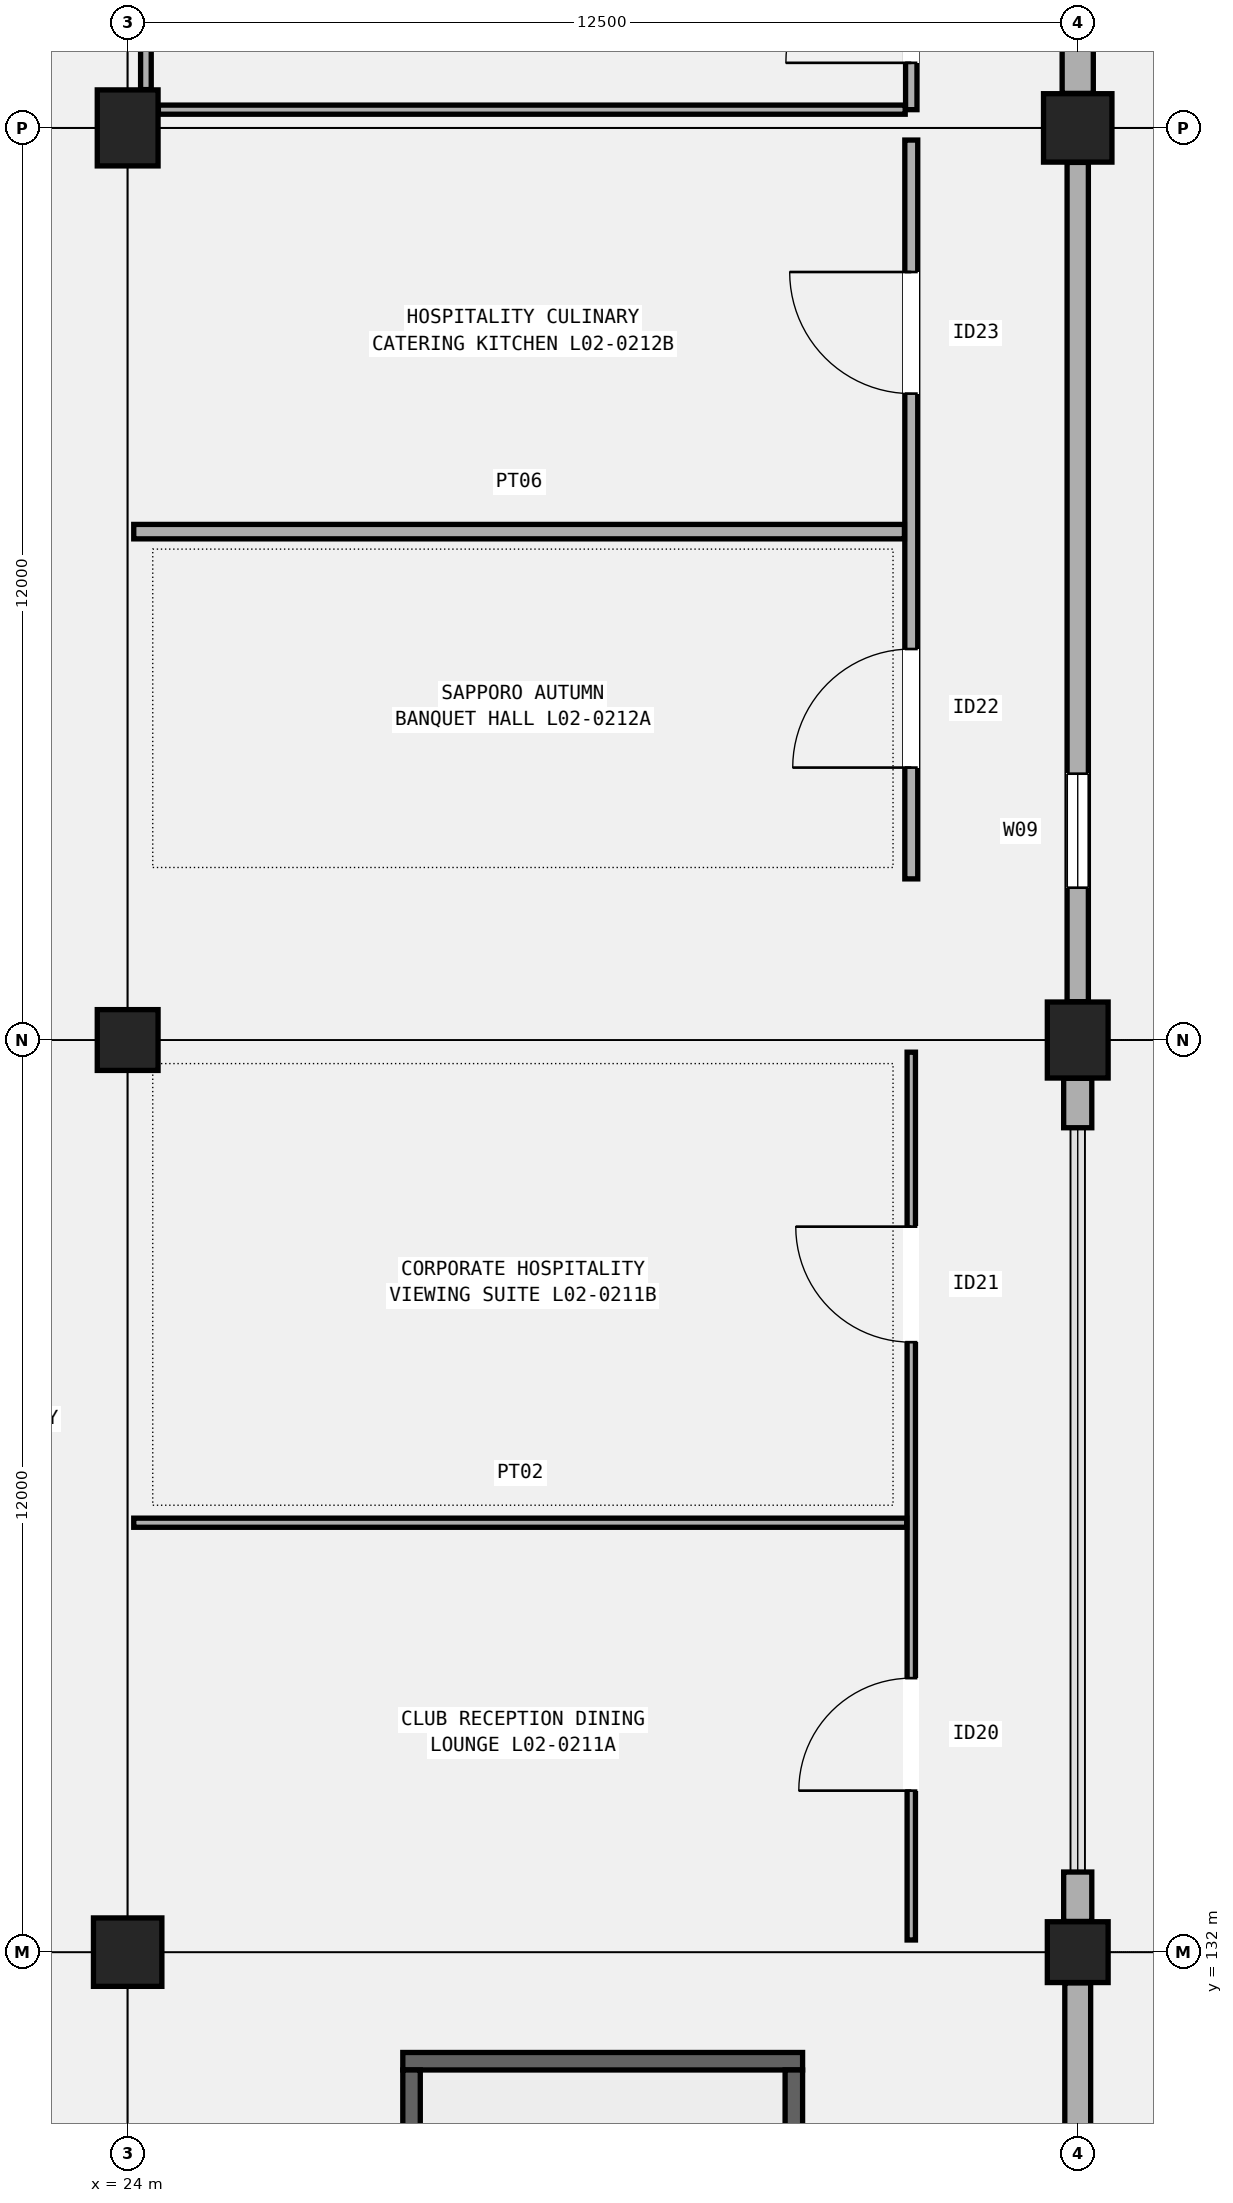
"""IFC4 building model, lengths in metres.
Left out: names, types, materials, properties, quantities, classifications, styles, units other than length and angle.
Written with IfcOpenShell. Run it as: python <this file> out.ifc"""

import sys

from ifc_helpers import new_model, si_unit, direction, frame, frame_2d, origin, origin_2d, place, context, subcontext, project, spatial, rectangle, extrude, element, fill, save


model = new_model("IFC4")
c1 = context("Model", 3, precision=1e-05, world=origin(), true_north=direction((0.0, 1.0)))
c2 = subcontext(c1, "Body", "Model", "MODEL_VIEW")
j1 = project(units=[si_unit("LENGTHUNIT", "METRE"), si_unit("PLANEANGLEUNIT", "RADIAN")], contexts=[c1])
p1 = place(None, origin())
s1 = spatial("IfcSite", under=j1, at=p1, CompositionType="ELEMENT")
p2 = place(p1, origin())
s2 = spatial("IfcBuilding", under=s1, at=p2, CompositionType="ELEMENT")
p3 = place(p2, frame((0.0, 0.0, 10.2)))
s3 = spatial("IfcBuildingStorey", under=s2, at=p3, CompositionType="ELEMENT", Elevation=10.2)
p4 = place(p3, frame((24.0, 132.0, 0.0), z_axis=(0.0, 0.0, 1.0), x_axis=(1.0, 0.0, 0.0)))
e1 = element("IfcColumn", 1, at=p4, inside=s3, PredefinedType="COLUMN", context=c2, shape_type="SweptSolid", body=[
    extrude(rectangle(XDim=0.9, YDim=0.9, at=origin_2d()), origin(), (0.0, 0.0, 1.0), 5.1),
])
p5 = place(p3, frame((24.0, 144.0, 0.0), z_axis=(0.0, 0.0, 1.0), x_axis=(1.0, 0.0, 0.0)))
e2 = element("IfcColumn", 2, at=p5, inside=s3, PredefinedType="COLUMN", context=c2, shape_type="SweptSolid", body=[
    extrude(rectangle(XDim=0.8, YDim=0.8, at=origin_2d()), origin(), (0.0, 0.0, 1.0), 5.1),
])
p6 = place(p3, frame((24.0, 156.0, 0.0), z_axis=(0.0, 0.0, 1.0), x_axis=(1.0, 0.0, 0.0)))
e3 = element("IfcColumn", 3, at=p6, inside=s3, PredefinedType="COLUMN", context=c2, shape_type="SweptSolid", body=[
    extrude(rectangle(XDim=0.8, YDim=1.0, at=origin_2d()), origin(), (0.0, 0.0, 1.0), 5.1),
])
p7 = place(p3, frame((36.5, 132.0, 0.0), z_axis=(0.0, 0.0, 1.0), x_axis=(1.0, 0.0, 0.0)))
e4 = element("IfcColumn", 4, at=p7, inside=s3, PredefinedType="COLUMN", context=c2, shape_type="SweptSolid", body=[
    extrude(rectangle(XDim=0.8, YDim=0.8, at=origin_2d()), origin(), (0.0, 0.0, 1.0), 5.1),
])
p8 = place(p3, frame((36.5, 144.0, 0.0), z_axis=(0.0, 0.0, 1.0), x_axis=(1.0, 0.0, 0.0)))
e5 = element("IfcColumn", 5, at=p8, inside=s3, PredefinedType="COLUMN", context=c2, shape_type="SweptSolid", body=[
    extrude(rectangle(XDim=0.8, YDim=1.0, at=origin_2d()), origin(), (0.0, 0.0, 1.0), 5.1),
])
p9 = place(p3, frame((36.5, 156.0, 0.0), z_axis=(0.0, 0.0, 1.0), x_axis=(1.0, 0.0, 0.0)))
e6 = element("IfcColumn", 6, at=p9, inside=s3, PredefinedType="COLUMN", context=c2, shape_type="SweptSolid", body=[
    extrude(rectangle(XDim=0.9, YDim=0.9, at=origin_2d()), origin(), (0.0, 0.0, 1.0), 5.1),
])
p10 = place(p3, frame((36.5, 120.454, 0.0), z_axis=(0.0, 0.0, 1.0), x_axis=(0.0, 1.0, 0.0)))
e7 = element("IfcWall", 7, at=p10, inside=s3, PredefinedType="SOLIDWALL", context=c2, shape_type="SweptSolid", body=[
    extrude(rectangle(XDim=11.142, YDim=0.34, at=frame_2d((5.571, 0.0))), origin(), (0.0, 0.0, 1.0), 4.12),
])
p11 = place(p10, frame((1.5, 0.0, 0.95)))
e8 = element("IfcOpeningElement", 8, at=p11, cuts=e7, PredefinedType="OPENING", context=c2, shape_type="SweptSolid", body=[
    extrude(rectangle(XDim=1.35, YDim=2.4, at=frame_2d((0.675, 1.2))), frame((0.0, 0.18, 0.0), z_axis=(0.0, -1.0, 0.0), x_axis=(1.0, 0.0, 0.0)), (0.0, 0.0, 1.0), 0.36),
])
p12 = place(p3, frame((36.5, 132.404, 0.0), z_axis=(0.0, 0.0, 1.0), x_axis=(0.0, 1.0, 0.0)))
e9 = element("IfcWall", 9, at=p12, inside=s3, PredefinedType="SOLIDWALL", context=c2, shape_type="SweptSolid", body=[
    extrude(rectangle(XDim=0.65, YDim=0.37, at=frame_2d((0.325, 0.0))), origin(), (0.0, 0.0, 1.0), 4.232),
])
p13 = place(p3, frame((36.5, 142.846, 0.0), z_axis=(0.0, 0.0, 1.0), x_axis=(0.0, 1.0, 0.0)))
e10 = element("IfcWall", 10, at=p13, inside=s3, PredefinedType="SOLIDWALL", context=c2, shape_type="SweptSolid", body=[
    extrude(rectangle(XDim=0.65, YDim=0.37, at=frame_2d((0.325, 0.0))), origin(), (0.0, 0.0, 1.0), 4.232),
])
p14 = place(p3, frame((36.5, 144.504, 0.0), z_axis=(0.0, 0.0, 1.0), x_axis=(0.0, 1.0, 0.0)))
e11 = element("IfcWall", 11, at=p14, inside=s3, PredefinedType="SOLIDWALL", context=c2, shape_type="SweptSolid", body=[
    extrude(rectangle(XDim=11.042, YDim=0.28, at=frame_2d((5.521, 0.0))), origin(), (0.0, 0.0, 1.0), 4.02),
])
p15 = place(p14, frame((1.5, 0.0, 0.95)))
e12 = element("IfcOpeningElement", 12, at=p15, cuts=e11, PredefinedType="OPENING", context=c2, shape_type="SweptSolid", body=[
    extrude(rectangle(XDim=1.5, YDim=1.8, at=frame_2d((0.75, 0.9))), frame((0.0, 0.15, 0.0), z_axis=(0.0, -1.0, 0.0), x_axis=(1.0, 0.0, 0.0)), (0.0, 0.0, 1.0), 0.3),
])
p16 = place(p3, frame((36.5, 156.454, 0.0), z_axis=(0.0, 0.0, 1.0), x_axis=(0.0, 1.0, 0.0)))
e13 = element("IfcWall", 13, at=p16, inside=s3, PredefinedType="SOLIDWALL", context=c2, shape_type="SweptSolid", body=[
    extrude(rectangle(XDim=11.142, YDim=0.41, at=frame_2d((5.571, 0.0))), origin(), (0.0, 0.0, 1.0), 4.12),
])
p17 = place(p16, frame((1.5, 0.0, 0.95)))
e14 = element("IfcOpeningElement", 14, at=p17, cuts=e13, PredefinedType="OPENING", context=c2, shape_type="SweptSolid", body=[
    extrude(rectangle(XDim=1.5, YDim=2.25, at=frame_2d((0.75, 1.125))), frame((0.0, 0.215, 0.0), z_axis=(0.0, -1.0, 0.0), x_axis=(1.0, 0.0, 0.0)), (0.0, 0.0, 1.0), 0.43),
])
p18 = place(p3, frame((27.62, 130.565, 0.0), z_axis=(0.0, 0.0, 1.0), x_axis=(1.0, 0.0, 0.0)))
e15 = element("IfcWall", 15, at=p18, inside=s3, PredefinedType="SHEAR", context=c2, shape_type="SweptSolid", body=[
    extrude(rectangle(XDim=5.26, YDim=0.23, at=frame_2d((2.63, 0.0))), origin(), (0.0, 0.0, 1.0), 4.82),
])
for number, where, z_axis, x_axis in (
    (16, (27.735, 121.55, 0.0), (0.0, 0.0, 1.0), (0.0, 1.0, 0.0)),
    (17, (32.765, 121.55, 0.0), (0.0, 0.0, 1.0), (0.0, 1.0, 0.0)),
):
    element("IfcWall", number, at=place(p3, frame(where, z_axis=z_axis, x_axis=x_axis)), inside=s3, PredefinedType="SHEAR", context=c2, shape_type="SweptSolid", body=[
        extrude(rectangle(XDim=8.9, YDim=0.23, at=frame_2d((4.45, 0.0))), origin(), (0.0, 0.0, 1.0), 4.82),
    ])
p19 = place(p3, frame((34.31, 132.16, 0.0), z_axis=(0.0, 0.0, 1.0), x_axis=(0.0, 1.0, 0.0)))
e18 = element("IfcWall", 18, at=p19, inside=s3, PredefinedType="PARTITIONING", context=c2, shape_type="SweptSolid", body=[
    extrude(rectangle(XDim=11.68, YDim=0.11, at=frame_2d((5.84, 0.0))), origin(), (0.0, 0.0, 1.0), 4.22),
])
p20 = place(p19, frame((1.965, 0.0, 0.0)))
e19 = element("IfcOpeningElement", 19, at=p20, cuts=e18, PredefinedType="OPENING", context=c2, shape_type="SweptSolid", body=[
    extrude(rectangle(XDim=1.48, YDim=2.24, at=frame_2d((0.74, 1.12))), frame((0.0, 0.065, 0.0), z_axis=(0.0, -1.0, 0.0), x_axis=(1.0, 0.0, 0.0)), (0.0, 0.0, 1.0), 0.13),
])
p21 = place(p19, frame((7.865, 0.0, 0.0)))
e20 = element("IfcOpeningElement", 20, at=p21, cuts=e18, PredefinedType="OPENING", context=c2, shape_type="SweptSolid", body=[
    extrude(rectangle(XDim=1.52, YDim=2.28, at=frame_2d((0.76, 1.14))), frame((0.0, 0.065, 0.0), z_axis=(0.0, -1.0, 0.0), x_axis=(1.0, 0.0, 0.0)), (0.0, 0.0, 1.0), 0.13),
])
p22 = place(p3, frame((24.08, 137.65, 0.0), z_axis=(0.0, 0.0, 1.0), x_axis=(1.0, 0.0, 0.0)))
e21 = element("IfcWall", 21, at=p22, inside=s3, PredefinedType="PARTITIONING", context=c2, shape_type="SweptSolid", body=[
    extrude(rectangle(XDim=10.17, YDim=0.12, at=frame_2d((5.085, 0.0))), origin(), (0.0, 0.0, 1.0), 4.22),
])
p23 = place(p3, frame((34.31, 146.12, 0.0), z_axis=(0.0, 0.0, 1.0), x_axis=(0.0, 1.0, 0.0)))
e22 = element("IfcWall", 22, at=p23, inside=s3, PredefinedType="PARTITIONING", context=c2, shape_type="SweptSolid", body=[
    extrude(rectangle(XDim=9.72, YDim=0.17, at=frame_2d((4.86, 0.0))), origin(), (0.0, 0.0, 1.0), 4.22),
])
p24 = place(p23, frame((1.464, 0.0, 0.0)))
e23 = element("IfcOpeningElement", 23, at=p24, cuts=e22, PredefinedType="OPENING", context=c2, shape_type="SweptSolid", body=[
    extrude(rectangle(XDim=1.56, YDim=2.26, at=frame_2d((0.78, 1.13))), frame((0.0, 0.095, 0.0), z_axis=(0.0, -1.0, 0.0), x_axis=(1.0, 0.0, 0.0)), (0.0, 0.0, 1.0), 0.19),
])
p25 = place(p23, frame((6.384, 0.0, 0.0)))
e24 = element("IfcOpeningElement", 24, at=p25, cuts=e22, PredefinedType="OPENING", context=c2, shape_type="SweptSolid", body=[
    extrude(rectangle(XDim=1.6, YDim=2.3, at=frame_2d((0.8, 1.15))), frame((0.0, 0.095, 0.0), z_axis=(0.0, -1.0, 0.0), x_axis=(1.0, 0.0, 0.0)), (0.0, 0.0, 1.0), 0.19),
])
p26 = place(p3, frame((24.08, 150.688, 0.0), z_axis=(0.0, 0.0, 1.0), x_axis=(1.0, 0.0, 0.0)))
e25 = element("IfcWall", 25, at=p26, inside=s3, PredefinedType="PARTITIONING", context=c2, shape_type="SweptSolid", body=[
    extrude(rectangle(XDim=10.14, YDim=0.19, at=frame_2d((5.07, 0.0))), origin(), (0.0, 0.0, 1.0), 4.22),
])
p27 = place(p3, frame((34.31, 156.24, 0.0), z_axis=(0.0, 0.0, 1.0), x_axis=(0.0, 1.0, 0.0)))
e26 = element("IfcWall", 26, at=p27, inside=s3, PredefinedType="PARTITIONING", context=c2, shape_type="SweptSolid", body=[
    extrude(rectangle(XDim=11.736, YDim=0.15, at=frame_2d((5.868, 0.0))), origin(), (0.0, 0.0, 1.0), 4.22),
])
p28 = place(p27, frame((0.616, 0.0, 0.0)))
e27 = element("IfcOpeningElement", 27, at=p28, cuts=e26, PredefinedType="OPENING", context=c2, shape_type="SweptSolid", body=[
    extrude(rectangle(XDim=1.65, YDim=2.28, at=frame_2d((0.825, 1.14))), frame((0.0, 0.085, 0.0), z_axis=(0.0, -1.0, 0.0), x_axis=(1.0, 0.0, 0.0)), (0.0, 0.0, 1.0), 0.17),
])
p29 = place(p27, frame((4.192, 0.0, 0.0)))
e28 = element("IfcOpeningElement", 28, at=p29, cuts=e26, PredefinedType="OPENING", context=c2, shape_type="SweptSolid", body=[
    extrude(rectangle(XDim=1.7, YDim=2.32, at=frame_2d((0.85, 1.16))), frame((0.0, 0.085, 0.0), z_axis=(0.0, -1.0, 0.0), x_axis=(1.0, 0.0, 0.0)), (0.0, 0.0, 1.0), 0.17),
])
p30 = place(p27, frame((8.48, 0.0, 0.0)))
e29 = element("IfcOpeningElement", 29, at=p30, cuts=e26, PredefinedType="OPENING", context=c2, shape_type="SweptSolid", body=[
    extrude(rectangle(XDim=1.76, YDim=2.3, at=frame_2d((0.88, 1.15))), frame((0.0, 0.085, 0.0), z_axis=(0.0, -1.0, 0.0), x_axis=(1.0, 0.0, 0.0)), (0.0, 0.0, 1.0), 0.17),
])
p31 = place(p3, frame((24.404, 156.24, 0.0), z_axis=(0.0, 0.0, 1.0), x_axis=(1.0, 0.0, 0.0)))
e30 = element("IfcWall", 30, at=p31, inside=s3, PredefinedType="PARTITIONING", context=c2, shape_type="SweptSolid", body=[
    extrude(rectangle(XDim=9.826, YDim=0.12, at=frame_2d((4.913, 0.0))), origin(), (0.0, 0.0, 1.0), 3.98),
])
p32 = place(p3, frame((24.24, 156.504, 0.0), z_axis=(0.0, 0.0, 1.0), x_axis=(0.0, 1.0, 0.0)))
e31 = element("IfcWall", 31, at=p32, inside=s3, PredefinedType="PARTITIONING", context=c2, shape_type="SweptSolid", body=[
    extrude(rectangle(XDim=11.042, YDim=0.14, at=frame_2d((5.521, 0.0))), origin(), (0.0, 0.0, 1.0), 3.98),
])
p33 = place(p15, origin())
e32 = element("IfcWindow", 32, at=p33, inside=s3, PartitioningType="SINGLE_PANEL", PredefinedType="WINDOW", context=c2, shape_type="SweptSolid", body=[
    extrude(rectangle(XDim=1.5, YDim=1.8, at=frame_2d((0.75, 0.9))), frame((0.0, 0.03, 0.0), z_axis=(0.0, -1.0, 0.0), x_axis=(1.0, 0.0, 0.0)), (0.0, 0.0, 1.0), 0.06),
])
fill(e12, e32)
p34 = place(p20, origin())
e33 = element("IfcDoor", 33, at=p34, inside=s3, OperationType="SINGLE_SWING_LEFT", PredefinedType="DOOR", context=c2, shape_type="SweptSolid", body=[
    extrude(rectangle(XDim=1.48, YDim=2.24, at=frame_2d((0.74, 1.12))), frame((0.0, 0.025, 0.0), z_axis=(0.0, -1.0, 0.0), x_axis=(1.0, 0.0, 0.0)), (0.0, 0.0, 1.0), 0.05),
])
fill(e19, e33)
p35 = place(p21, origin())
e34 = element("IfcDoor", 34, at=p35, inside=s3, OperationType="SINGLE_SWING_RIGHT", PredefinedType="DOOR", context=c2, shape_type="SweptSolid", body=[
    extrude(rectangle(XDim=1.52, YDim=2.28, at=frame_2d((0.76, 1.14))), frame((0.0, 0.025, 0.0), z_axis=(0.0, -1.0, 0.0), x_axis=(1.0, 0.0, 0.0)), (0.0, 0.0, 1.0), 0.05),
])
fill(e20, e34)
p36 = place(p24, origin())
e35 = element("IfcDoor", 35, at=p36, inside=s3, OperationType="SINGLE_SWING_LEFT", PredefinedType="DOOR", context=c2, shape_type="SweptSolid", body=[
    extrude(rectangle(XDim=1.56, YDim=2.26, at=frame_2d((0.78, 1.13))), frame((0.0, 0.025, 0.0), z_axis=(0.0, -1.0, 0.0), x_axis=(1.0, 0.0, 0.0)), (0.0, 0.0, 1.0), 0.05),
])
fill(e23, e35)
p37 = place(p25, origin())
e36 = element("IfcDoor", 36, at=p37, inside=s3, OperationType="SINGLE_SWING_RIGHT", PredefinedType="DOOR", context=c2, shape_type="SweptSolid", body=[
    extrude(rectangle(XDim=1.6, YDim=2.3, at=frame_2d((0.8, 1.15))), frame((0.0, 0.025, 0.0), z_axis=(0.0, -1.0, 0.0), x_axis=(1.0, 0.0, 0.0)), (0.0, 0.0, 1.0), 0.05),
])
fill(e24, e36)
p38 = place(p28, origin())
e37 = element("IfcDoor", 37, at=p38, inside=s3, OperationType="SINGLE_SWING_LEFT", PredefinedType="DOOR", context=c2, shape_type="SweptSolid", body=[
    extrude(rectangle(XDim=1.65, YDim=2.28, at=frame_2d((0.825, 1.14))), frame((0.0, 0.025, 0.0), z_axis=(0.0, -1.0, 0.0), x_axis=(1.0, 0.0, 0.0)), (0.0, 0.0, 1.0), 0.05),
])
fill(e27, e37)
save(model, sys.argv[1])
